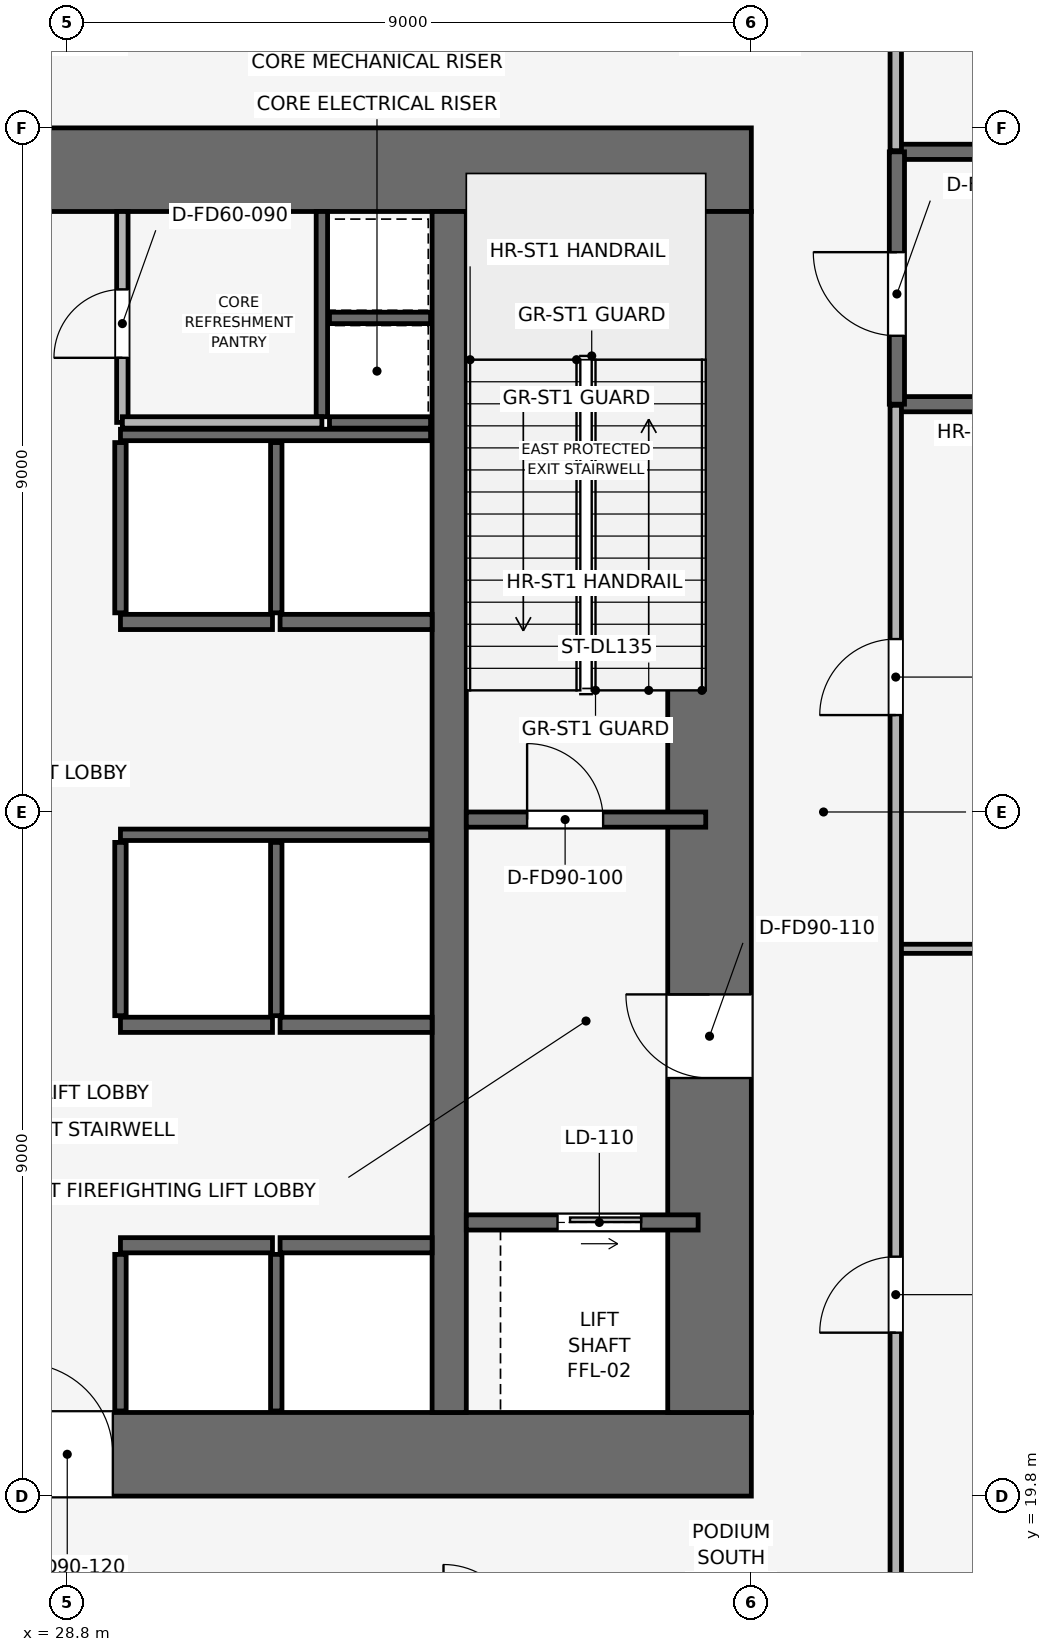
"""IFC4 building model, lengths in metres.
Left out: names, types, materials, properties, quantities, classifications, styles, units other than length and angle.
Written with IfcOpenShell. Run it as: python <this file> out.ifc"""

import sys

from ifc_helpers import new_model, si_unit, direction, frame, frame_2d, origin, place, context, subcontext, project, spatial, rectangle, extrude, element, fill, save


model = new_model("IFC4")
c1 = context("Model", 3, precision=1e-05, world=origin(), true_north=direction((0.0, 1.0)))
c2 = subcontext(c1, "Body", "Model", "MODEL_VIEW")
j1 = project(units=[si_unit("LENGTHUNIT", "METRE"), si_unit("PLANEANGLEUNIT", "RADIAN")], contexts=[c1])
p1 = place(None, origin())
s1 = spatial("IfcSite", under=j1, at=p1, CompositionType="ELEMENT")
p2 = place(p1, origin())
s2 = spatial("IfcBuilding", under=s1, at=p2, CompositionType="ELEMENT")
p3 = place(p2, frame((0.0, 0.0, 8.4)))
s3 = spatial("IfcBuildingStorey", under=s2, at=p3, CompositionType="ELEMENT", Elevation=8.4)
p4 = place(p3, frame((19.8, 20.35, 0.0), z_axis=(0.0, 0.0, 1.0), x_axis=(1.0, 0.0, 0.0)))
e1 = element("IfcWall", 1, at=p4, inside=s3, PredefinedType="SHEAR", context=c2, shape_type="SweptSolid", body=[
    extrude(rectangle(XDim=18.0, YDim=1.1, at=frame_2d((9.0, 0.0))), origin(), (0.0, 0.0, 1.0), 5.4),
])
p5 = place(p4, frame((8.4, 0.0, 0.0)))
e2 = element("IfcOpeningElement", 2, at=p5, cuts=e1, PredefinedType="OPENING", context=c2, shape_type="SweptSolid", body=[
    extrude(rectangle(XDim=1.2, YDim=2.2, at=frame_2d((0.6, 1.1))), frame((0.0, 0.56, 0.0), z_axis=(0.0, -1.0, 0.0), x_axis=(1.0, 0.0, 0.0)), (0.0, 0.0, 1.0), 1.12),
])
p6 = place(p3, frame((19.8, 37.25, 0.0), z_axis=(0.0, 0.0, 1.0), x_axis=(1.0, 0.0, 0.0)))
e3 = element("IfcWall", 3, at=p6, inside=s3, PredefinedType="SHEAR", context=c2, shape_type="SweptSolid", body=[
    extrude(rectangle(XDim=18.0, YDim=1.1, at=frame_2d((9.0, 0.0))), origin(), (0.0, 0.0, 1.0), 5.4),
])
p7 = place(p6, frame((7.05, 0.0, 0.0)))
e4 = element("IfcOpeningElement", 4, at=p7, cuts=e3, PredefinedType="OPENING", context=c2, shape_type="SweptSolid", body=[
    extrude(rectangle(XDim=1.1, YDim=2.15, at=frame_2d((0.55, 1.075))), frame((0.0, 0.56, 0.0), z_axis=(0.0, -1.0, 0.0), x_axis=(1.0, 0.0, 0.0)), (0.0, 0.0, 1.0), 1.12),
])
p8 = place(p3, frame((37.25, 20.9, 0.0), z_axis=(0.0, 0.0, 1.0), x_axis=(0.0, 1.0, 0.0)))
e5 = element("IfcWall", 5, at=p8, inside=s3, PredefinedType="SHEAR", context=c2, shape_type="SweptSolid", body=[
    extrude(rectangle(XDim=15.8, YDim=1.1, at=frame_2d((7.9, 0.0))), origin(), (0.0, 0.0, 1.0), 5.4),
])
p9 = place(p8, frame((4.4, 0.0, 0.0)))
e6 = element("IfcOpeningElement", 6, at=p9, cuts=e5, PredefinedType="OPENING", context=c2, shape_type="SweptSolid", body=[
    extrude(rectangle(XDim=1.1, YDim=2.15, at=frame_2d((0.55, 1.075))), frame((0.0, 0.56, 0.0), z_axis=(0.0, -1.0, 0.0), x_axis=(1.0, 0.0, 0.0)), (0.0, 0.0, 1.0), 1.12),
])
p10 = place(p3, frame((33.825, 20.9, 0.0), z_axis=(0.0, 0.0, 1.0), x_axis=(0.0, 1.0, 0.0)))
e7 = element("IfcWall", 7, at=p10, inside=s3, PredefinedType="SHEAR", context=c2, shape_type="SweptSolid", body=[
    extrude(rectangle(XDim=15.8, YDim=0.45, at=frame_2d((7.9, 0.0))), origin(), (0.0, 0.0, 1.0), 5.4),
])
p11 = place(p3, frame((34.05, 28.7, 0.0), z_axis=(0.0, 0.0, 1.0), x_axis=(1.0, 0.0, 0.0)))
e8 = element("IfcWall", 8, at=p11, inside=s3, PredefinedType="SHEAR", context=c2, shape_type="SweptSolid", body=[
    extrude(rectangle(XDim=3.15, YDim=0.2, at=frame_2d((1.575, 0.0))), origin(), (0.0, 0.0, 1.0), 5.05),
])
p12 = place(p11, frame((0.8, 0.0, 0.0)))
e9 = element("IfcOpeningElement", 9, at=p12, cuts=e8, PredefinedType="OPENING", context=c2, shape_type="SweptSolid", body=[
    extrude(rectangle(XDim=1.0, YDim=2.1, at=frame_2d((0.5, 1.05))), frame((0.0, 0.11, 0.0), z_axis=(0.0, -1.0, 0.0), x_axis=(1.0, 0.0, 0.0)), (0.0, 0.0, 1.0), 0.22),
])
p13 = place(p3, frame((32.15, 34.0, 0.0), z_axis=(0.0, 0.0, 1.0), x_axis=(0.0, 1.0, 0.0)))
e10 = element("IfcWall", 10, at=p13, inside=s3, PredefinedType="SHEAR", context=c2, shape_type="SweptSolid", body=[
    extrude(rectangle(XDim=2.7, YDim=0.15, at=frame_2d((1.35, 0.0))), origin(), (0.0, 0.0, 1.0), 5.05),
])
for number, where, z_axis, x_axis in (
    (11, (32.25, 33.925, 0.0), (0.0, 0.0, 1.0), (1.0, 0.0, 0.0)),
    (12, (32.25, 35.3, 0.0), (0.0, 0.0, 1.0), (1.0, 0.0, 0.0)),
):
    element("IfcWall", number, at=place(p3, frame(where, z_axis=z_axis, x_axis=x_axis)), inside=s3, PredefinedType="SHEAR", context=c2, shape_type="SweptSolid", body=[
        extrude(rectangle(XDim=1.33, YDim=0.15, at=frame_2d((0.665, 0.0))), origin(), (0.0, 0.0, 1.0), 5.05),
    ])
p14 = place(p3, frame((34.05, 23.4, 0.0), z_axis=(0.0, 0.0, 1.0), x_axis=(1.0, 0.0, 0.0)))
e13 = element("IfcWall", 13, at=p14, inside=s3, PredefinedType="SHEAR", context=c2, shape_type="SweptSolid", body=[
    extrude(rectangle(XDim=3.05, YDim=0.2, at=frame_2d((1.525, 0.0))), origin(), (0.0, 0.0, 1.0), 5.05),
])
p15 = place(p14, frame((1.2, 0.0, 0.0)))
e14 = element("IfcOpeningElement", 14, at=p15, cuts=e13, PredefinedType="OPENING", context=c2, shape_type="SweptSolid", body=[
    extrude(rectangle(XDim=1.1, YDim=2.15, at=frame_2d((0.55, 1.075))), frame((0.0, 0.11, 0.0), z_axis=(0.0, -1.0, 0.0), x_axis=(1.0, 0.0, 0.0)), (0.0, 0.0, 1.0), 0.22),
])
for number, where, z_axis, x_axis in (
    (15, (29.5, 23.1, 0.0), (0.0, 0.0, 1.0), (1.0, 0.0, 0.0)),
    (16, (31.6, 23.1, 0.0), (0.0, 0.0, 1.0), (1.0, 0.0, 0.0)),
    (17, (29.5, 26.0, 0.0), (0.0, 0.0, 1.0), (1.0, 0.0, 0.0)),
    (18, (31.6, 26.0, 0.0), (0.0, 0.0, 1.0), (1.0, 0.0, 0.0)),
    (19, (29.5, 31.3, 0.0), (0.0, 0.0, 1.0), (1.0, 0.0, 0.0)),
    (20, (31.6, 31.3, 0.0), (0.0, 0.0, 1.0), (1.0, 0.0, 0.0)),
):
    element("IfcWall", number, at=place(p3, frame(where, z_axis=z_axis, x_axis=x_axis)), inside=s3, PredefinedType="SHEAR", context=c2, shape_type="SweptSolid", body=[
        extrude(rectangle(XDim=2.0, YDim=0.2, at=frame_2d((1.0, 0.0))), origin(), (0.0, 0.0, 1.0), 5.05),
    ])
for number, where, z_axis, x_axis in (
    (21, (29.5, 20.92, 0.0), (0.0, 0.0, 1.0), (0.0, 1.0, 0.0)),
    (22, (31.55, 20.92, 0.0), (0.0, 0.0, 1.0), (0.0, 1.0, 0.0)),
):
    element("IfcWall", number, at=place(p3, frame(where, z_axis=z_axis, x_axis=x_axis)), inside=s3, PredefinedType="SHEAR", context=c2, shape_type="SweptSolid", body=[
        extrude(rectangle(XDim=2.06, YDim=0.15, at=frame_2d((1.03, 0.0))), origin(), (0.0, 0.0, 1.0), 5.05),
    ])
p16 = place(p3, frame((29.5, 28.5, 0.0), z_axis=(0.0, 0.0, 1.0), x_axis=(1.0, 0.0, 0.0)))
e23 = element("IfcWall", 23, at=p16, inside=s3, PredefinedType="SHEAR", context=c2, shape_type="SweptSolid", body=[
    extrude(rectangle(XDim=4.08, YDim=0.15, at=frame_2d((2.04, 0.0))), origin(), (0.0, 0.0, 1.0), 5.05),
])
for number, where, z_axis, x_axis in (
    (24, (29.5, 26.12, 0.0), (0.0, 0.0, 1.0), (0.0, 1.0, 0.0)),
    (25, (31.55, 26.12, 0.0), (0.0, 0.0, 1.0), (0.0, 1.0, 0.0)),
):
    element("IfcWall", number, at=place(p3, frame(where, z_axis=z_axis, x_axis=x_axis)), inside=s3, PredefinedType="SHEAR", context=c2, shape_type="SweptSolid", body=[
        extrude(rectangle(XDim=2.28, YDim=0.15, at=frame_2d((1.14, 0.0))), origin(), (0.0, 0.0, 1.0), 5.05),
    ])
p17 = place(p3, frame((29.5, 33.76, 0.0), z_axis=(0.0, 0.0, 1.0), x_axis=(1.0, 0.0, 0.0)))
e26 = element("IfcWall", 26, at=p17, inside=s3, PredefinedType="SHEAR", context=c2, shape_type="SweptSolid", body=[
    extrude(rectangle(XDim=4.08, YDim=0.15, at=frame_2d((2.04, 0.0))), origin(), (0.0, 0.0, 1.0), 5.05),
])
for number, where, z_axis, x_axis in (
    (27, (29.5, 31.42, 0.0), (0.0, 0.0, 1.0), (0.0, 1.0, 0.0)),
    (28, (31.55, 31.42, 0.0), (0.0, 0.0, 1.0), (0.0, 1.0, 0.0)),
):
    element("IfcWall", number, at=place(p3, frame(where, z_axis=z_axis, x_axis=x_axis)), inside=s3, PredefinedType="SHEAR", context=c2, shape_type="SweptSolid", body=[
        extrude(rectangle(XDim=2.24, YDim=0.15, at=frame_2d((1.12, 0.0))), origin(), (0.0, 0.0, 1.0), 5.05),
    ])
for number, where, z_axis, x_axis in (
    (29, (39.715, 34.165, 0.0), (0.0, 0.0, 1.0), (1.0, 0.0, 0.0)),
    (30, (39.715, 37.485, 0.0), (0.0, 0.0, 1.0), (1.0, 0.0, 0.0)),
):
    element("IfcWall", number, at=place(p3, frame(where, z_axis=z_axis, x_axis=x_axis)), inside=s3, PredefinedType="SHEAR", context=c2, shape_type="SweptSolid", body=[
        extrude(rectangle(XDim=8.57, YDim=0.2, at=frame_2d((4.285, 0.0))), origin(), (0.0, 0.0, 1.0), 5.398),
    ])
p18 = place(p3, frame((39.715, 34.165, 0.0), z_axis=(0.0, 0.0, 1.0), x_axis=(0.0, 1.0, 0.0)))
e31 = element("IfcWall", 31, at=p18, inside=s3, PredefinedType="SHEAR", context=c2, shape_type="SweptSolid", body=[
    extrude(rectangle(XDim=3.32, YDim=0.2, at=frame_2d((1.66, 0.0))), origin(), (0.0, 0.0, 1.0), 5.398),
])
p19 = place(p18, frame((0.9, 0.0, 0.0)))
e32 = element("IfcOpeningElement", 32, at=p19, cuts=e31, PredefinedType="OPENING", context=c2, shape_type="SweptSolid", body=[
    extrude(rectangle(XDim=1.1, YDim=2.15, at=frame_2d((0.55, 1.075))), frame((0.0, 0.11, 0.0), z_axis=(0.0, -1.0, 0.0), x_axis=(1.0, 0.0, 0.0)), (0.0, 0.0, 1.0), 0.22),
])
p20 = place(p3, frame((29.525, 33.925, 0.0), z_axis=(0.0, 0.0, 1.0), x_axis=(0.0, 1.0, 0.0)))
e33 = element("IfcWall", 33, at=p20, inside=s3, PredefinedType="PARTITIONING", context=c2, shape_type="SweptSolid", body=[
    extrude(rectangle(XDim=2.775, YDim=0.15, at=frame_2d((1.387, 0.0))), origin(), (0.0, 0.0, 1.0), 5.05),
])
p21 = place(p20, frame((0.85, 0.0, 0.0)))
e34 = element("IfcOpeningElement", 34, at=p21, cuts=e33, PredefinedType="OPENING", context=c2, shape_type="SweptSolid", body=[
    extrude(rectangle(XDim=0.9, YDim=2.1, at=frame_2d((0.45, 1.05))), frame((0.0, 0.085, 0.0), z_axis=(0.0, -1.0, 0.0), x_axis=(1.0, 0.0, 0.0)), (0.0, 0.0, 1.0), 0.17),
])
p22 = place(p3, frame((29.525, 33.925, 0.0), z_axis=(0.0, 0.0, 1.0), x_axis=(1.0, 0.0, 0.0)))
e35 = element("IfcWall", 35, at=p22, inside=s3, PredefinedType="PARTITIONING", context=c2, shape_type="SweptSolid", body=[
    extrude(rectangle(XDim=2.625, YDim=0.15, at=frame_2d((1.312, 0.0))), origin(), (0.0, 0.0, 1.0), 5.05),
])
p23 = place(p3, frame((39.7, 27.0, 0.0), z_axis=(0.0, 0.0, 1.0), x_axis=(1.0, 0.0, 0.0)))
e36 = element("IfcWall", 36, at=p23, inside=s3, PredefinedType="PARTITIONING", context=c2, shape_type="SweptSolid", body=[
    extrude(rectangle(XDim=17.05, YDim=0.12, at=frame_2d((8.525, 0.0))), origin(), (0.0, 0.0, 1.0), 4.035),
])
p24 = place(p3, frame((39.7, 17.9, 0.0), z_axis=(0.0, 0.0, 1.0), x_axis=(0.0, 1.0, 0.0)))
e37 = element("IfcWall", 37, at=p24, inside=s3, PredefinedType="PARTITIONING", context=c2, shape_type="SweptSolid", body=[
    extrude(rectangle(XDim=16.25, YDim=0.15, at=frame_2d((8.125, 0.0))), origin(), (0.0, 0.0, 1.0), 4.135),
])
p25 = place(p24, frame((4.05, 0.0, 0.0)))
e38 = element("IfcOpeningElement", 38, at=p25, cuts=e37, PredefinedType="OPENING", context=c2, shape_type="SweptSolid", body=[
    extrude(rectangle(XDim=1.0, YDim=2.15, at=frame_2d((0.5, 1.075))), frame((0.0, 0.085, 0.0), z_axis=(0.0, -1.0, 0.0), x_axis=(1.0, 0.0, 0.0)), (0.0, 0.0, 1.0), 0.17),
])
p26 = place(p24, frame((12.175, 0.0, 0.0)))
e39 = element("IfcOpeningElement", 39, at=p26, cuts=e37, PredefinedType="OPENING", context=c2, shape_type="SweptSolid", body=[
    extrude(rectangle(XDim=1.0, YDim=2.15, at=frame_2d((0.5, 1.075))), frame((0.0, 0.085, 0.0), z_axis=(0.0, -1.0, 0.0), x_axis=(1.0, 0.0, 0.0)), (0.0, 0.0, 1.0), 0.17),
])
p27 = place(p3, frame((39.7, 37.5, 0.0), z_axis=(0.0, 0.0, 1.0), x_axis=(0.0, 1.0, 0.0)))
e40 = element("IfcWall", 40, at=p27, inside=s3, PredefinedType="PARTITIONING", context=c2, shape_type="SweptSolid", body=[
    extrude(rectangle(XDim=2.2, YDim=0.15, at=frame_2d((1.1, 0.0))), origin(), (0.0, 0.0, 1.0), 5.05),
])
p28 = place(p12, origin())
e41 = element("IfcDoor", 41, at=p28, inside=s3, OperationType="SINGLE_SWING_LEFT", PredefinedType="DOOR", context=c2, shape_type="SweptSolid", body=[
    extrude(rectangle(XDim=1.0, YDim=2.1, at=frame_2d((0.5, 1.05))), frame((0.0, 0.025, 0.0), z_axis=(0.0, -1.0, 0.0), x_axis=(1.0, 0.0, 0.0)), (0.0, 0.0, 1.0), 0.05),
])
fill(e9, e41)
p29 = place(p15, origin())
e42 = element("IfcDoor", 42, at=p29, inside=s3, OperationType="SLIDING_TO_RIGHT", PredefinedType="DOOR", context=c2, shape_type="SweptSolid", body=[
    extrude(rectangle(XDim=1.1, YDim=2.15, at=frame_2d((0.55, 1.075))), frame((0.0, 0.025, 0.0), z_axis=(0.0, -1.0, 0.0), x_axis=(1.0, 0.0, 0.0)), (0.0, 0.0, 1.0), 0.05),
])
fill(e14, e42)
p30 = place(p19, origin())
e43 = element("IfcDoor", 43, at=p30, inside=s3, OperationType="SINGLE_SWING_RIGHT", PredefinedType="DOOR", context=c2, shape_type="SweptSolid", body=[
    extrude(rectangle(XDim=1.1, YDim=2.15, at=frame_2d((0.55, 1.075))), frame((0.0, 0.025, 0.0), z_axis=(0.0, -1.0, 0.0), x_axis=(1.0, 0.0, 0.0)), (0.0, 0.0, 1.0), 0.05),
])
fill(e32, e43)
p31 = place(p21, origin())
e44 = element("IfcDoor", 44, at=p31, inside=s3, OperationType="SINGLE_SWING_LEFT", PredefinedType="DOOR", context=c2, shape_type="SweptSolid", body=[
    extrude(rectangle(XDim=0.9, YDim=2.1, at=frame_2d((0.45, 1.05))), frame((0.0, 0.025, 0.0), z_axis=(0.0, -1.0, 0.0), x_axis=(1.0, 0.0, 0.0)), (0.0, 0.0, 1.0), 0.05),
])
fill(e34, e44)
p32 = place(p25, origin())
e45 = element("IfcDoor", 45, at=p32, inside=s3, OperationType="SINGLE_SWING_LEFT", PredefinedType="DOOR", context=c2, shape_type="SweptSolid", body=[
    extrude(rectangle(XDim=1.0, YDim=2.15, at=frame_2d((0.5, 1.075))), frame((0.0, 0.025, 0.0), z_axis=(0.0, -1.0, 0.0), x_axis=(1.0, 0.0, 0.0)), (0.0, 0.0, 1.0), 0.05),
])
fill(e38, e45)
p33 = place(p26, origin())
e46 = element("IfcDoor", 46, at=p33, inside=s3, OperationType="SINGLE_SWING_LEFT", PredefinedType="DOOR", context=c2, shape_type="SweptSolid", body=[
    extrude(rectangle(XDim=1.0, YDim=2.15, at=frame_2d((0.5, 1.075))), frame((0.0, 0.025, 0.0), z_axis=(0.0, -1.0, 0.0), x_axis=(1.0, 0.0, 0.0)), (0.0, 0.0, 1.0), 0.05),
])
fill(e39, e46)
p34 = place(p9, origin())
e47 = element("IfcDoor", 47, at=p34, inside=s3, OperationType="SINGLE_SWING_RIGHT", PredefinedType="DOOR", context=c2, shape_type="SweptSolid", body=[
    extrude(rectangle(XDim=1.1, YDim=2.15, at=frame_2d((0.55, 1.075))), frame((0.0, 0.025, 0.0), z_axis=(0.0, -1.0, 0.0), x_axis=(1.0, 0.0, 0.0)), (0.0, 0.0, 1.0), 0.05),
])
fill(e6, e47)
p35 = place(p5, origin())
e48 = element("IfcDoor", 48, at=p35, inside=s3, OperationType="SINGLE_SWING_LEFT", PredefinedType="DOOR", context=c2, shape_type="SweptSolid", body=[
    extrude(rectangle(XDim=1.2, YDim=2.2, at=frame_2d((0.6, 1.1))), frame((0.0, 0.025, 0.0), z_axis=(0.0, -1.0, 0.0), x_axis=(1.0, 0.0, 0.0)), (0.0, 0.0, 1.0), 0.05),
])
fill(e2, e48)
save(model, sys.argv[1])
